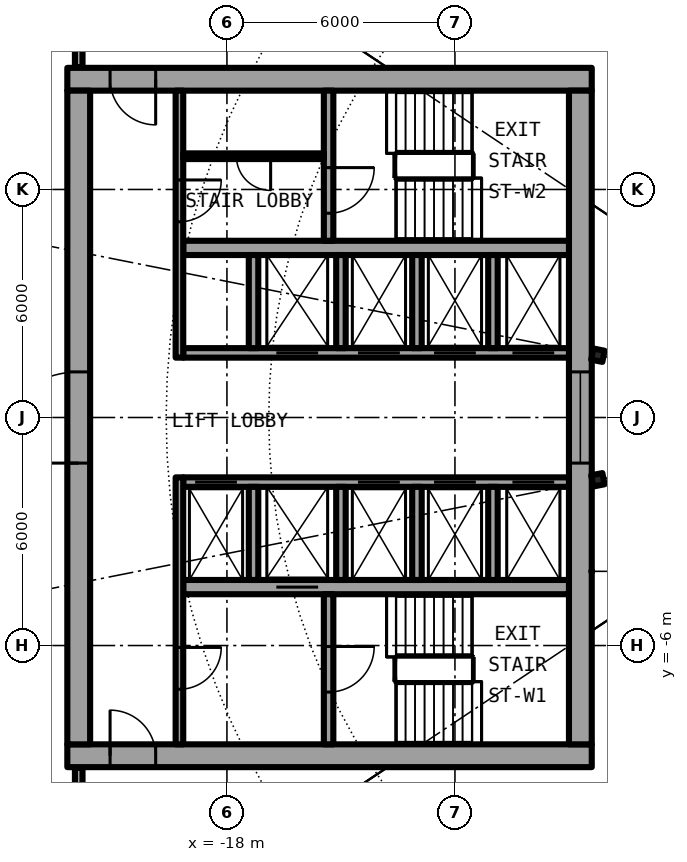
"""IFC4 building model, lengths in metres.
Left out: names, types, materials, properties, quantities, classifications, styles, units other than length and angle.
Written with IfcOpenShell. Run it as: python <this file> out.ifc"""

import sys

from ifc_helpers import new_model, si_unit, direction, frame, frame_2d, origin, origin_2d, place, context, subcontext, project, spatial, rectangle, i_section, extrude, element, fill, save


model = new_model("IFC4")
c1 = context("Model", 3, precision=1e-05, world=origin(), true_north=direction((0.0, 1.0)))
c2 = subcontext(c1, "Body", "Model", "MODEL_VIEW")
j1 = project(units=[si_unit("LENGTHUNIT", "METRE"), si_unit("PLANEANGLEUNIT", "RADIAN")], contexts=[c1])
p1 = place(None, origin())
s1 = spatial("IfcSite", under=j1, at=p1, CompositionType="ELEMENT")
p2 = place(p1, origin())
s2 = spatial("IfcBuilding", under=s1, at=p2, CompositionType="ELEMENT")
p3 = place(p2, frame((0.0, 0.0, 139.1)))
s3 = spatial("IfcBuildingStorey", under=s2, at=p3, CompositionType="ELEMENT", Elevation=139.1)
for number, where, z_axis, x_axis in (
    (1, (-8.239, 1.639, 0.0), (0.0, 0.0, 1.0), (-0.981, 0.195, 0.0)),
    (2, (-8.239, -1.639, 0.0), (0.0, 0.0, 1.0), (-0.981, -0.195, 0.0)),
):
    element("IfcColumn", number, at=place(p3, frame(where, z_axis=z_axis, x_axis=x_axis)), inside=s3, PredefinedType="COLUMN", context=c2, shape_type="SweptSolid", body=[
        extrude(i_section(OverallWidth=0.3, OverallDepth=0.3, WebThickness=0.011, FlangeThickness=0.019, FilletRadius=0.027, at=origin_2d()), origin(), (0.0, 0.0, 1.0), 6.1),
    ])
p4 = place(p3, frame((-22.2, -8.9, 0.0), z_axis=(0.0, 0.0, 1.0), x_axis=(1.0, 0.0, 0.0)))
e3 = element("IfcWall", 3, at=p4, inside=s3, PredefinedType="SHEAR", context=c2, shape_type="SweptSolid", body=[
    extrude(rectangle(XDim=13.8, YDim=0.6, at=frame_2d((6.9, 0.0))), origin(), (0.0, 0.0, 1.0), 6.1),
])
p5 = place(p4, frame((1.125, 0.0, 0.0)))
e4 = element("IfcOpeningElement", 4, at=p5, cuts=e3, PredefinedType="OPENING", context=c2, shape_type="SweptSolid", body=[
    extrude(rectangle(XDim=1.2, YDim=2.3, at=frame_2d((0.6, 1.15))), frame((0.0, 0.31, 0.0), z_axis=(0.0, -1.0, 0.0), x_axis=(1.0, 0.0, 0.0)), (0.0, 0.0, 1.0), 0.62),
])
p6 = place(p3, frame((-8.4, 8.9, 0.0), z_axis=(0.0, 0.0, 1.0), x_axis=(-1.0, 0.0, 0.0)))
e5 = element("IfcWall", 5, at=p6, inside=s3, PredefinedType="SHEAR", context=c2, shape_type="SweptSolid", body=[
    extrude(rectangle(XDim=13.8, YDim=0.6, at=frame_2d((6.9, 0.0))), origin(), (0.0, 0.0, 1.0), 6.1),
])
p7 = place(p6, frame((11.475, 0.0, 0.0)))
e6 = element("IfcOpeningElement", 6, at=p7, cuts=e5, PredefinedType="OPENING", context=c2, shape_type="SweptSolid", body=[
    extrude(rectangle(XDim=1.2, YDim=2.3, at=frame_2d((0.6, 1.15))), frame((0.0, 0.31, 0.0), z_axis=(0.0, -1.0, 0.0), x_axis=(1.0, 0.0, 0.0)), (0.0, 0.0, 1.0), 0.62),
])
p8 = place(p3, frame((-21.9, -8.6, 0.0), z_axis=(0.0, 0.0, 1.0), x_axis=(0.0, 1.0, 0.0)))
e7 = element("IfcWall", 7, at=p8, inside=s3, PredefinedType="SHEAR", context=c2, shape_type="SweptSolid", body=[
    extrude(rectangle(XDim=17.2, YDim=0.6, at=frame_2d((8.6, 0.0))), origin(), (0.0, 0.0, 1.0), 6.1),
])
p9 = place(p8, frame((7.4, 0.0, 0.0)))
e8 = element("IfcOpeningElement", 8, at=p9, cuts=e7, PredefinedType="OPENING", context=c2, shape_type="SweptSolid", body=[
    extrude(rectangle(XDim=2.4, YDim=2.3, at=frame_2d((1.2, 1.15))), frame((0.0, 0.31, 0.0), z_axis=(0.0, -1.0, 0.0), x_axis=(1.0, 0.0, 0.0)), (0.0, 0.0, 1.0), 0.62),
])
p10 = place(p3, frame((-8.7, 8.6, 0.0), z_axis=(0.0, 0.0, 1.0), x_axis=(0.0, -1.0, 0.0)))
e9 = element("IfcWall", 9, at=p10, inside=s3, PredefinedType="SHEAR", context=c2, shape_type="SweptSolid", body=[
    extrude(rectangle(XDim=17.2, YDim=0.6, at=frame_2d((8.6, 0.0))), origin(), (0.0, 0.0, 1.0), 6.1),
])
p11 = place(p10, frame((7.4, 0.0, 0.1)))
e10 = element("IfcOpeningElement", 10, at=p11, cuts=e9, PredefinedType="OPENING", context=c2, shape_type="SweptSolid", body=[
    extrude(rectangle(XDim=2.4, YDim=2.2, at=frame_2d((1.2, 1.1))), frame((0.0, 0.31, 0.0), z_axis=(0.0, -1.0, 0.0), x_axis=(1.0, 0.0, 0.0)), (0.0, 0.0, 1.0), 0.62),
])
p12 = place(p3, frame((-9.0, -1.7, 0.0), z_axis=(0.0, 0.0, 1.0), x_axis=(-1.0, 0.0, 0.0)))
e11 = element("IfcWall", 11, at=p12, inside=s3, PredefinedType="SHEAR", context=c2, shape_type="SweptSolid", body=[
    extrude(rectangle(XDim=10.15, YDim=0.25, at=frame_2d((5.075, 0.0))), origin(), (0.0, 0.0, 1.0), 6.1),
])
p13 = place(p12, frame((0.387, 0.0, 0.0)))
e12 = element("IfcOpeningElement", 12, at=p13, cuts=e11, PredefinedType="OPENING", context=c2, shape_type="SweptSolid", body=[
    extrude(rectangle(XDim=1.1, YDim=2.3, at=frame_2d((0.55, 1.15))), frame((0.0, 0.135, 0.0), z_axis=(0.0, -1.0, 0.0), x_axis=(1.0, 0.0, 0.0)), (0.0, 0.0, 1.0), 0.27),
])
p14 = place(p12, frame((2.45, 0.0, 0.0)))
e13 = element("IfcOpeningElement", 13, at=p14, cuts=e11, PredefinedType="OPENING", context=c2, shape_type="SweptSolid", body=[
    extrude(rectangle(XDim=1.1, YDim=2.3, at=frame_2d((0.55, 1.15))), frame((0.0, 0.135, 0.0), z_axis=(0.0, -1.0, 0.0), x_axis=(1.0, 0.0, 0.0)), (0.0, 0.0, 1.0), 0.27),
])
p15 = place(p12, frame((4.45, 0.0, 0.0)))
e14 = element("IfcOpeningElement", 14, at=p15, cuts=e11, PredefinedType="OPENING", context=c2, shape_type="SweptSolid", body=[
    extrude(rectangle(XDim=1.1, YDim=2.3, at=frame_2d((0.55, 1.15))), frame((0.0, 0.135, 0.0), z_axis=(0.0, -1.0, 0.0), x_axis=(1.0, 0.0, 0.0)), (0.0, 0.0, 1.0), 0.27),
])
p16 = place(p12, frame((8.738, 0.0, 0.0)))
e15 = element("IfcOpeningElement", 15, at=p16, cuts=e11, PredefinedType="OPENING", context=c2, shape_type="SweptSolid", body=[
    extrude(rectangle(XDim=1.1, YDim=2.3, at=frame_2d((0.55, 1.15))), frame((0.0, 0.135, 0.0), z_axis=(0.0, -1.0, 0.0), x_axis=(1.0, 0.0, 0.0)), (0.0, 0.0, 1.0), 0.27),
])
p17 = place(p3, frame((-9.0, -4.462, 0.0), z_axis=(0.0, 0.0, 1.0), x_axis=(-1.0, 0.0, 0.0)))
e16 = element("IfcWall", 16, at=p17, inside=s3, PredefinedType="SHEAR", context=c2, shape_type="SweptSolid", body=[
    extrude(rectangle(XDim=10.15, YDim=0.375, at=frame_2d((5.075, 0.0))), origin(), (0.0, 0.0, 1.0), 6.1),
])
p18 = place(p17, frame((6.6, 0.0, 0.0)))
e17 = element("IfcOpeningElement", 17, at=p18, cuts=e16, PredefinedType="OPENING", context=c2, shape_type="SweptSolid", body=[
    extrude(rectangle(XDim=1.1, YDim=2.3, at=frame_2d((0.55, 1.15))), frame((0.0, 0.198, 0.0), z_axis=(0.0, -1.0, 0.0), x_axis=(1.0, 0.0, 0.0)), (0.0, 0.0, 1.0), 0.395),
])
p19 = place(p3, frame((-15.325, -4.65, 0.0), z_axis=(0.0, 0.0, 1.0), x_axis=(0.0, -1.0, 0.0)))
e18 = element("IfcWall", 18, at=p19, inside=s3, PredefinedType="SHEAR", context=c2, shape_type="SweptSolid", body=[
    extrude(rectangle(XDim=3.95, YDim=0.25, at=frame_2d((1.975, 0.0))), origin(), (0.0, 0.0, 1.0), 6.1),
])
p20 = place(p19, frame((1.375, 0.0, 0.0)))
e19 = element("IfcOpeningElement", 19, at=p20, cuts=e18, PredefinedType="OPENING", context=c2, shape_type="SweptSolid", body=[
    extrude(rectangle(XDim=1.2, YDim=2.3, at=frame_2d((0.6, 1.15))), frame((0.0, 0.135, 0.0), z_axis=(0.0, -1.0, 0.0), x_axis=(1.0, 0.0, 0.0)), (0.0, 0.0, 1.0), 0.27),
])
for number, where, z_axis, x_axis in (
    (20, (-15.0, -1.825, 0.0), (0.0, 0.0, 1.0), (0.0, -1.0, 0.0)),
    (21, (-17.3, -1.825, 0.0), (0.0, 0.0, 1.0), (0.0, -1.0, 0.0)),
):
    element("IfcWall", number, at=place(p3, frame(where, z_axis=z_axis, x_axis=x_axis)), inside=s3, PredefinedType="SOLIDWALL", context=c2, shape_type="SweptSolid", body=[
        extrude(rectangle(XDim=2.45, YDim=0.25, at=frame_2d((1.225, 0.0))), origin(), (0.0, 0.0, 1.0), 5.75),
    ])
p21 = place(p3, frame((-19.25, -1.575, 0.0), z_axis=(0.0, 0.0, 1.0), x_axis=(0.0, -1.0, 0.0)))
e22 = element("IfcWall", 22, at=p21, inside=s3, PredefinedType="SOLIDWALL", context=c2, shape_type="SweptSolid", body=[
    extrude(rectangle(XDim=7.025, YDim=0.2, at=frame_2d((3.513, 0.0))), origin(), (0.0, 0.0, 1.0), 5.75),
])
p22 = place(p21, frame((4.475, 0.0, 0.0)))
e23 = element("IfcOpeningElement", 23, at=p22, cuts=e22, PredefinedType="OPENING", context=c2, shape_type="SweptSolid", body=[
    extrude(rectangle(XDim=1.1, YDim=2.3, at=frame_2d((0.55, 1.15))), frame((0.0, 0.11, 0.0), z_axis=(0.0, -1.0, 0.0), x_axis=(1.0, 0.0, 0.0)), (0.0, 0.0, 1.0), 0.22),
])
p23 = place(p3, frame((-9.0, 1.7, 0.0), z_axis=(0.0, 0.0, 1.0), x_axis=(-1.0, 0.0, 0.0)))
e24 = element("IfcWall", 24, at=p23, inside=s3, PredefinedType="SHEAR", context=c2, shape_type="SweptSolid", body=[
    extrude(rectangle(XDim=10.15, YDim=0.25, at=frame_2d((5.075, 0.0))), origin(), (0.0, 0.0, 1.0), 6.1),
])
p24 = place(p23, frame((0.387, 0.0, 0.0)))
e25 = element("IfcOpeningElement", 25, at=p24, cuts=e24, PredefinedType="OPENING", context=c2, shape_type="SweptSolid", body=[
    extrude(rectangle(XDim=1.1, YDim=2.3, at=frame_2d((0.55, 1.15))), frame((0.0, 0.135, 0.0), z_axis=(0.0, -1.0, 0.0), x_axis=(1.0, 0.0, 0.0)), (0.0, 0.0, 1.0), 0.27),
])
p25 = place(p23, frame((2.45, 0.0, 0.0)))
e26 = element("IfcOpeningElement", 26, at=p25, cuts=e24, PredefinedType="OPENING", context=c2, shape_type="SweptSolid", body=[
    extrude(rectangle(XDim=1.1, YDim=2.3, at=frame_2d((0.55, 1.15))), frame((0.0, 0.135, 0.0), z_axis=(0.0, -1.0, 0.0), x_axis=(1.0, 0.0, 0.0)), (0.0, 0.0, 1.0), 0.27),
])
p26 = place(p23, frame((4.45, 0.0, 0.0)))
e27 = element("IfcOpeningElement", 27, at=p26, cuts=e24, PredefinedType="OPENING", context=c2, shape_type="SweptSolid", body=[
    extrude(rectangle(XDim=1.1, YDim=2.3, at=frame_2d((0.55, 1.15))), frame((0.0, 0.135, 0.0), z_axis=(0.0, -1.0, 0.0), x_axis=(1.0, 0.0, 0.0)), (0.0, 0.0, 1.0), 0.27),
])
p27 = place(p23, frame((6.6, 0.0, 0.0)))
e28 = element("IfcOpeningElement", 28, at=p27, cuts=e24, PredefinedType="OPENING", context=c2, shape_type="SweptSolid", body=[
    extrude(rectangle(XDim=1.1, YDim=2.3, at=frame_2d((0.55, 1.15))), frame((0.0, 0.135, 0.0), z_axis=(0.0, -1.0, 0.0), x_axis=(1.0, 0.0, 0.0)), (0.0, 0.0, 1.0), 0.27),
])
p28 = place(p3, frame((-9.0, 4.462, 0.0), z_axis=(0.0, 0.0, 1.0), x_axis=(-1.0, 0.0, 0.0)))
e29 = element("IfcWall", 29, at=p28, inside=s3, PredefinedType="SHEAR", context=c2, shape_type="SweptSolid", body=[
    extrude(rectangle(XDim=10.15, YDim=0.375, at=frame_2d((5.075, 0.0))), origin(), (0.0, 0.0, 1.0), 6.1),
])
p29 = place(p3, frame((-15.325, 8.6, 0.0), z_axis=(0.0, 0.0, 1.0), x_axis=(0.0, -1.0, 0.0)))
e30 = element("IfcWall", 30, at=p29, inside=s3, PredefinedType="SHEAR", context=c2, shape_type="SweptSolid", body=[
    extrude(rectangle(XDim=3.95, YDim=0.25, at=frame_2d((1.975, 0.0))), origin(), (0.0, 0.0, 1.0), 6.1),
])
p30 = place(p29, frame((2.025, 0.0, 0.0)))
e31 = element("IfcOpeningElement", 31, at=p30, cuts=e30, PredefinedType="OPENING", context=c2, shape_type="SweptSolid", body=[
    extrude(rectangle(XDim=1.2, YDim=2.3, at=frame_2d((0.6, 1.15))), frame((0.0, 0.135, 0.0), z_axis=(0.0, -1.0, 0.0), x_axis=(1.0, 0.0, 0.0)), (0.0, 0.0, 1.0), 0.27),
])
for number, where, z_axis, x_axis in (
    (32, (-15.0, 1.825, 0.0), (0.0, 0.0, 1.0), (0.0, 1.0, 0.0)),
    (33, (-17.3, 1.825, 0.0), (0.0, 0.0, 1.0), (0.0, 1.0, 0.0)),
):
    element("IfcWall", number, at=place(p3, frame(where, z_axis=z_axis, x_axis=x_axis)), inside=s3, PredefinedType="SOLIDWALL", context=c2, shape_type="SweptSolid", body=[
        extrude(rectangle(XDim=2.45, YDim=0.25, at=frame_2d((1.225, 0.0))), origin(), (0.0, 0.0, 1.0), 5.75),
    ])
p31 = place(p3, frame((-19.25, 8.6, 0.0), z_axis=(0.0, 0.0, 1.0), x_axis=(0.0, -1.0, 0.0)))
e34 = element("IfcWall", 34, at=p31, inside=s3, PredefinedType="SOLIDWALL", context=c2, shape_type="SweptSolid", body=[
    extrude(rectangle(XDim=7.025, YDim=0.2, at=frame_2d((3.513, 0.0))), origin(), (0.0, 0.0, 1.0), 5.75),
])
p32 = place(p31, frame((2.35, 0.0, 0.0)))
e35 = element("IfcOpeningElement", 35, at=p32, cuts=e34, PredefinedType="OPENING", context=c2, shape_type="SweptSolid", body=[
    extrude(rectangle(XDim=1.1, YDim=2.3, at=frame_2d((0.55, 1.15))), frame((0.0, 0.11, 0.0), z_axis=(0.0, -1.0, 0.0), x_axis=(1.0, 0.0, 0.0)), (0.0, 0.0, 1.0), 0.22),
])
for number, where, z_axis, x_axis in (
    (36, (-11.0, -1.825, 0.0), (0.0, 0.0, 1.0), (0.0, -1.0, 0.0)),
    (37, (-13.0, -1.825, 0.0), (0.0, 0.0, 1.0), (0.0, -1.0, 0.0)),
    (38, (-11.0, 1.825, 0.0), (0.0, 0.0, 1.0), (0.0, 1.0, 0.0)),
    (39, (-13.0, 1.825, 0.0), (0.0, 0.0, 1.0), (0.0, 1.0, 0.0)),
):
    element("IfcWall", number, at=place(p3, frame(where, z_axis=z_axis, x_axis=x_axis)), inside=s3, PredefinedType="SOLIDWALL", context=c2, shape_type="SweptSolid", body=[
        extrude(rectangle(XDim=2.45, YDim=0.25, at=frame_2d((1.225, 0.0))), origin(), (0.0, 0.0, 1.0), 5.75),
    ])
p33 = place(p3, frame((-15.45, 6.875, 0.0), z_axis=(0.0, 0.0, 1.0), x_axis=(-1.0, 0.0, 0.0)))
e40 = element("IfcWall", 40, at=p33, inside=s3, PredefinedType="PARTITIONING", context=c2, shape_type="SweptSolid", body=[
    extrude(rectangle(XDim=3.7, YDim=0.15, at=frame_2d((1.85, 0.0))), origin(), (0.0, 0.0, 1.0), 5.75),
])
p34 = place(p33, frame((1.4, 0.0, 0.0)))
e41 = element("IfcOpeningElement", 41, at=p34, cuts=e40, PredefinedType="OPENING", context=c2, shape_type="SweptSolid", body=[
    extrude(rectangle(XDim=0.9, YDim=2.3, at=frame_2d((0.45, 1.15))), frame((0.0, 0.085, 0.0), z_axis=(0.0, -1.0, 0.0), x_axis=(1.0, 0.0, 0.0)), (0.0, 0.0, 1.0), 0.17),
])
p35 = place(p3, frame((-8.767, 25.819, 0.0), z_axis=(0.0, 0.0, 1.0), x_axis=(0.321524803789, -0.946901156694, 0.0)))
e42 = element("IfcWall", 42, at=p35, inside=s3, PredefinedType="PARTITIONING", context=c2, shape_type="SweptSolid", body=[
    extrude(rectangle(XDim=17.489, YDim=0.15, at=frame_2d((8.744, 0.0))), origin(), (0.0, 0.0, 1.0), 5.75),
])
for number, where, z_axis, x_axis in (
    (43, (-21.9, -12.62, 0.0), (0.0, 0.0, 1.0), (0.0, 1.0, 0.0)),
    (44, (-21.9, 9.22, 0.0), (0.0, 0.0, 1.0), (0.0, 1.0, 0.0)),
):
    element("IfcWall", number, at=place(p3, frame(where, z_axis=z_axis, x_axis=x_axis)), inside=s3, PredefinedType="PARTITIONING", context=c2, shape_type="SweptSolid", body=[
        extrude(rectangle(XDim=3.4, YDim=0.2, at=frame_2d((1.7, 0.0))), origin(), (0.0, 0.0, 1.0), 5.75),
    ])
p36 = place(p13, origin())
e45 = element("IfcDoor", 45, at=p36, inside=s3, OperationType="DOUBLE_DOOR_SLIDING", PredefinedType="DOOR", context=c2, shape_type="SweptSolid", body=[
    extrude(rectangle(XDim=1.1, YDim=2.3, at=frame_2d((0.55, 1.15))), frame((0.0, 0.025, 0.0), z_axis=(0.0, -1.0, 0.0), x_axis=(1.0, 0.0, 0.0)), (0.0, 0.0, 1.0), 0.05),
])
fill(e12, e45)
p37 = place(p14, origin())
e46 = element("IfcDoor", 46, at=p37, inside=s3, OperationType="DOUBLE_DOOR_SLIDING", PredefinedType="DOOR", context=c2, shape_type="SweptSolid", body=[
    extrude(rectangle(XDim=1.1, YDim=2.3, at=frame_2d((0.55, 1.15))), frame((0.0, 0.025, 0.0), z_axis=(0.0, -1.0, 0.0), x_axis=(1.0, 0.0, 0.0)), (0.0, 0.0, 1.0), 0.05),
])
fill(e13, e46)
p38 = place(p15, origin())
e47 = element("IfcDoor", 47, at=p38, inside=s3, OperationType="DOUBLE_DOOR_SLIDING", PredefinedType="DOOR", context=c2, shape_type="SweptSolid", body=[
    extrude(rectangle(XDim=1.1, YDim=2.3, at=frame_2d((0.55, 1.15))), frame((0.0, 0.025, 0.0), z_axis=(0.0, -1.0, 0.0), x_axis=(1.0, 0.0, 0.0)), (0.0, 0.0, 1.0), 0.05),
])
fill(e14, e47)
p39 = place(p18, origin())
e48 = element("IfcDoor", 48, at=p39, inside=s3, OperationType="DOUBLE_DOOR_SLIDING", PredefinedType="DOOR", context=c2, shape_type="SweptSolid", body=[
    extrude(rectangle(XDim=1.1, YDim=2.3, at=frame_2d((0.55, 1.15))), frame((0.0, 0.025, 0.0), z_axis=(0.0, -1.0, 0.0), x_axis=(1.0, 0.0, 0.0)), (0.0, 0.0, 1.0), 0.05),
])
fill(e17, e48)
p40 = place(p16, origin())
e49 = element("IfcDoor", 49, at=p40, inside=s3, OperationType="DOUBLE_DOOR_SLIDING", PredefinedType="DOOR", context=c2, shape_type="SweptSolid", body=[
    extrude(rectangle(XDim=1.1, YDim=2.3, at=frame_2d((0.55, 1.15))), frame((0.0, 0.025, 0.0), z_axis=(0.0, -1.0, 0.0), x_axis=(1.0, 0.0, 0.0)), (0.0, 0.0, 1.0), 0.05),
])
fill(e15, e49)
p41 = place(p24, origin())
e50 = element("IfcDoor", 50, at=p41, inside=s3, OperationType="DOUBLE_DOOR_SLIDING", PredefinedType="DOOR", context=c2, shape_type="SweptSolid", body=[
    extrude(rectangle(XDim=1.1, YDim=2.3, at=frame_2d((0.55, 1.15))), frame((0.0, 0.025, 0.0), z_axis=(0.0, -1.0, 0.0), x_axis=(1.0, 0.0, 0.0)), (0.0, 0.0, 1.0), 0.05),
])
fill(e25, e50)
p42 = place(p25, origin())
e51 = element("IfcDoor", 51, at=p42, inside=s3, OperationType="DOUBLE_DOOR_SLIDING", PredefinedType="DOOR", context=c2, shape_type="SweptSolid", body=[
    extrude(rectangle(XDim=1.1, YDim=2.3, at=frame_2d((0.55, 1.15))), frame((0.0, 0.025, 0.0), z_axis=(0.0, -1.0, 0.0), x_axis=(1.0, 0.0, 0.0)), (0.0, 0.0, 1.0), 0.05),
])
fill(e26, e51)
p43 = place(p26, origin())
e52 = element("IfcDoor", 52, at=p43, inside=s3, OperationType="DOUBLE_DOOR_SLIDING", PredefinedType="DOOR", context=c2, shape_type="SweptSolid", body=[
    extrude(rectangle(XDim=1.1, YDim=2.3, at=frame_2d((0.55, 1.15))), frame((0.0, 0.025, 0.0), z_axis=(0.0, -1.0, 0.0), x_axis=(1.0, 0.0, 0.0)), (0.0, 0.0, 1.0), 0.05),
])
fill(e27, e52)
p44 = place(p27, origin())
e53 = element("IfcDoor", 53, at=p44, inside=s3, OperationType="DOUBLE_DOOR_SLIDING", PredefinedType="DOOR", context=c2, shape_type="SweptSolid", body=[
    extrude(rectangle(XDim=1.1, YDim=2.3, at=frame_2d((0.55, 1.15))), frame((0.0, 0.025, 0.0), z_axis=(0.0, -1.0, 0.0), x_axis=(1.0, 0.0, 0.0)), (0.0, 0.0, 1.0), 0.05),
])
fill(e28, e53)
p45 = place(p34, origin())
e54 = element("IfcDoor", 54, at=p45, inside=s3, OperationType="SINGLE_SWING_LEFT", PredefinedType="DOOR", context=c2, shape_type="SweptSolid", body=[
    extrude(rectangle(XDim=0.9, YDim=2.3, at=frame_2d((0.45, 1.15))), frame((0.0, 0.025, 0.0), z_axis=(0.0, -1.0, 0.0), x_axis=(1.0, 0.0, 0.0)), (0.0, 0.0, 1.0), 0.05),
])
fill(e41, e54)
p46 = place(p20, origin())
e55 = element("IfcDoor", 55, at=p46, inside=s3, OperationType="SINGLE_SWING_LEFT", PredefinedType="DOOR", context=c2, shape_type="SweptSolid", body=[
    extrude(rectangle(XDim=1.2, YDim=2.3, at=frame_2d((0.6, 1.15))), frame((0.0, 0.025, 0.0), z_axis=(0.0, -1.0, 0.0), x_axis=(1.0, 0.0, 0.0)), (0.0, 0.0, 1.0), 0.05),
])
fill(e19, e55)
p47 = place(p30, origin())
e56 = element("IfcDoor", 56, at=p47, inside=s3, OperationType="SINGLE_SWING_LEFT", PredefinedType="DOOR", context=c2, shape_type="SweptSolid", body=[
    extrude(rectangle(XDim=1.2, YDim=2.3, at=frame_2d((0.6, 1.15))), frame((0.0, 0.025, 0.0), z_axis=(0.0, -1.0, 0.0), x_axis=(1.0, 0.0, 0.0)), (0.0, 0.0, 1.0), 0.05),
])
fill(e31, e56)
p48 = place(p22, origin())
e57 = element("IfcDoor", 57, at=p48, inside=s3, OperationType="SINGLE_SWING_LEFT", PredefinedType="DOOR", context=c2, shape_type="SweptSolid", body=[
    extrude(rectangle(XDim=1.1, YDim=2.3, at=frame_2d((0.55, 1.15))), frame((0.0, 0.025, 0.0), z_axis=(0.0, -1.0, 0.0), x_axis=(1.0, 0.0, 0.0)), (0.0, 0.0, 1.0), 0.05),
])
fill(e23, e57)
p49 = place(p32, origin())
e58 = element("IfcDoor", 58, at=p49, inside=s3, OperationType="SINGLE_SWING_RIGHT", PredefinedType="DOOR", context=c2, shape_type="SweptSolid", body=[
    extrude(rectangle(XDim=1.1, YDim=2.3, at=frame_2d((0.55, 1.15))), frame((0.0, 0.025, 0.0), z_axis=(0.0, -1.0, 0.0), x_axis=(1.0, 0.0, 0.0)), (0.0, 0.0, 1.0), 0.05),
])
fill(e35, e58)
p50 = place(p5, origin())
e59 = element("IfcDoor", 59, at=p50, inside=s3, OperationType="SINGLE_SWING_RIGHT", PredefinedType="DOOR", context=c2, shape_type="SweptSolid", body=[
    extrude(rectangle(XDim=1.2, YDim=2.3, at=frame_2d((0.6, 1.15))), frame((0.0, 0.025, 0.0), z_axis=(0.0, -1.0, 0.0), x_axis=(1.0, 0.0, 0.0)), (0.0, 0.0, 1.0), 0.05),
])
fill(e4, e59)
p51 = place(p7, origin())
e60 = element("IfcDoor", 60, at=p51, inside=s3, OperationType="SINGLE_SWING_LEFT", PredefinedType="DOOR", context=c2, shape_type="SweptSolid", body=[
    extrude(rectangle(XDim=1.2, YDim=2.3, at=frame_2d((0.6, 1.15))), frame((0.0, 0.025, 0.0), z_axis=(0.0, -1.0, 0.0), x_axis=(1.0, 0.0, 0.0)), (0.0, 0.0, 1.0), 0.05),
])
fill(e6, e60)
p52 = place(p9, origin())
e61 = element("IfcDoor", 61, at=p52, inside=s3, OperationType="SINGLE_SWING_LEFT", PredefinedType="DOOR", context=c2, shape_type="SweptSolid", body=[
    extrude(rectangle(XDim=2.4, YDim=2.3, at=frame_2d((1.2, 1.15))), frame((0.0, 0.025, 0.0), z_axis=(0.0, -1.0, 0.0), x_axis=(1.0, 0.0, 0.0)), (0.0, 0.0, 1.0), 0.05),
])
fill(e8, e61)
p53 = place(p11, origin())
e62 = element("IfcWindow", 62, at=p53, inside=s3, PartitioningType="SINGLE_PANEL", PredefinedType="WINDOW", context=c2, shape_type="SweptSolid", body=[
    extrude(rectangle(XDim=2.4, YDim=2.2, at=frame_2d((1.2, 1.1))), frame((0.0, 0.03, 0.0), z_axis=(0.0, -1.0, 0.0), x_axis=(1.0, 0.0, 0.0)), (0.0, 0.0, 1.0), 0.06),
])
fill(e10, e62)
save(model, sys.argv[1])
